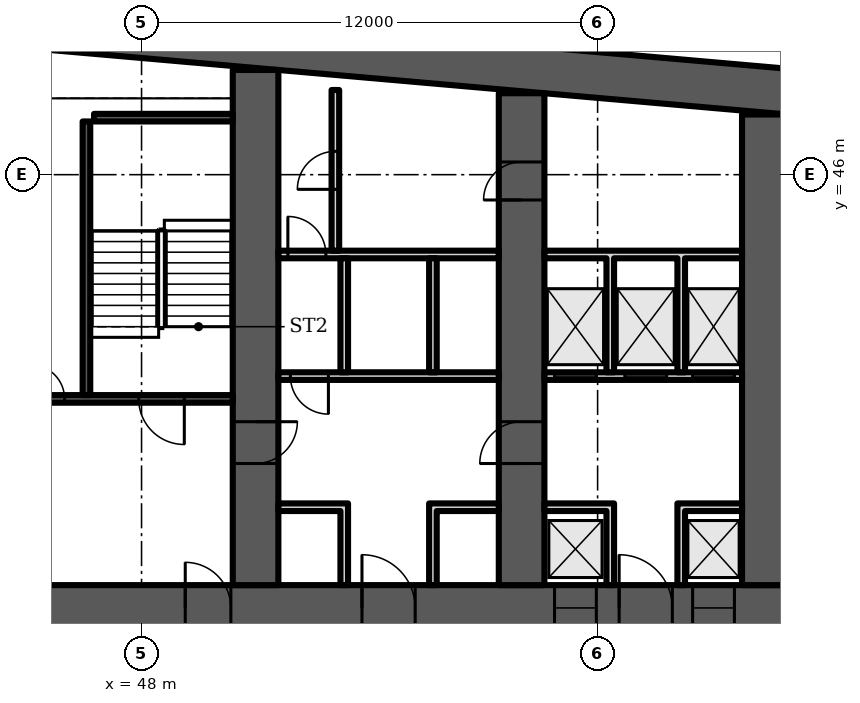
"""IFC4 building model, lengths in metres.
Left out: names, types, materials, properties, quantities, classifications, styles, units other than length and angle.
Written with IfcOpenShell. Run it as: python <this file> out.ifc"""

import sys

from ifc_helpers import new_model, si_unit, direction, frame, frame_2d, origin, place, context, subcontext, project, spatial, polyline, rectangle, outline, extrude, element, fill, save


model = new_model("IFC4")
c1 = context("Model", 3, precision=1e-05, world=origin(), true_north=direction((0.0, 1.0)))
c2 = subcontext(c1, "Body", "Model", "MODEL_VIEW")
j1 = project(units=[si_unit("LENGTHUNIT", "METRE"), si_unit("PLANEANGLEUNIT", "RADIAN")], contexts=[c1])
p1 = place(None, origin())
s1 = spatial("IfcSite", under=j1, at=p1, CompositionType="ELEMENT")
p2 = place(p1, origin())
s2 = spatial("IfcBuilding", under=s1, at=p2, CompositionType="ELEMENT")
p3 = place(p2, frame((0.0, 0.0, 81.1)))
s3 = spatial("IfcBuildingStorey", under=s2, at=p3, CompositionType="ELEMENT", Elevation=81.1)
p4 = place(p3, frame((0.0, 0.0, -0.0)))
e1 = element("IfcWall", 1, at=p4, inside=s3, PredefinedType="SHEAR", context=c2, shape_type="SweptSolid", body=[
    extrude(outline(polyline([(9.0, 47.583), (37.0, 50.032), (65.0, 47.583), (65.0, 48.787), (37.0, 51.237), (9.0, 48.787), (9.0, 47.583)])), origin(), (0.0, 0.0, 1.0), 3.6),
])
p5 = place(p3, frame((9.0, 34.6, 0.0), z_axis=(0.0, 0.0, 1.0), x_axis=(1.0, 0.0, 0.0)))
e2 = element("IfcWall", 2, at=p5, inside=s3, PredefinedType="SHEAR", context=c2, shape_type="SweptSolid", body=[
    extrude(rectangle(XDim=56.0, YDim=1.2, at=frame_2d((28.0, 0.0))), origin(), (0.0, 0.0, 1.0), 3.6),
])
p6 = place(p5, frame((2.0, 0.0, 0.0)))
e3 = element("IfcOpeningElement", 3, at=p6, cuts=e2, PredefinedType="OPENING", context=c2, shape_type="SweptSolid", body=[
    extrude(rectangle(XDim=1.0, YDim=2.1, at=frame_2d((0.5, 1.05))), frame((0.0, 0.61, 0.0), z_axis=(0.0, -1.0, 0.0), x_axis=(1.0, 0.0, 0.0)), (0.0, 0.0, 1.0), 1.22),
])
p7 = place(p5, frame((4.6, 0.0, 0.0)))
e4 = element("IfcOpeningElement", 4, at=p7, cuts=e2, PredefinedType="OPENING", context=c2, shape_type="SweptSolid", body=[
    extrude(rectangle(XDim=1.0, YDim=2.1, at=frame_2d((0.5, 1.05))), frame((0.0, 0.61, 0.0), z_axis=(0.0, -1.0, 0.0), x_axis=(1.0, 0.0, 0.0)), (0.0, 0.0, 1.0), 1.22),
])
p8 = place(p5, frame((7.867, 0.0, 0.0)))
e5 = element("IfcOpeningElement", 5, at=p8, cuts=e2, PredefinedType="OPENING", context=c2, shape_type="SweptSolid", body=[
    extrude(rectangle(XDim=1.1, YDim=2.1, at=frame_2d((0.55, 1.05))), frame((0.0, 0.61, 0.0), z_axis=(0.0, -1.0, 0.0), x_axis=(1.0, 0.0, 0.0)), (0.0, 0.0, 1.0), 1.22),
])
p9 = place(p5, frame((12.033, 0.0, 0.0)))
e6 = element("IfcOpeningElement", 6, at=p9, cuts=e2, PredefinedType="OPENING", context=c2, shape_type="SweptSolid", body=[
    extrude(rectangle(XDim=1.1, YDim=2.1, at=frame_2d((0.55, 1.05))), frame((0.0, 0.61, 0.0), z_axis=(0.0, -1.0, 0.0), x_axis=(1.0, 0.0, 0.0)), (0.0, 0.0, 1.0), 1.22),
])
p10 = place(p5, frame((9.8, 0.0, 0.0)))
e7 = element("IfcOpeningElement", 7, at=p10, cuts=e2, PredefinedType="OPENING", context=c2, shape_type="SweptSolid", body=[
    extrude(rectangle(XDim=1.4, YDim=2.1, at=frame_2d((0.7, 1.05))), frame((0.0, 0.61, 0.0), z_axis=(0.0, -1.0, 0.0), x_axis=(1.0, 0.0, 0.0)), (0.0, 0.0, 1.0), 1.22),
])
p11 = place(p5, frame((14.65, 0.0, 0.0)))
e8 = element("IfcOpeningElement", 8, at=p11, cuts=e2, PredefinedType="OPENING", context=c2, shape_type="SweptSolid", body=[
    extrude(rectangle(XDim=1.2, YDim=2.1, at=frame_2d((0.6, 1.05))), frame((0.0, 0.61, 0.0), z_axis=(0.0, -1.0, 0.0), x_axis=(1.0, 0.0, 0.0)), (0.0, 0.0, 1.0), 1.22),
])
p12 = place(p5, frame((21.867, 0.0, 0.0)))
e9 = element("IfcOpeningElement", 9, at=p12, cuts=e2, PredefinedType="OPENING", context=c2, shape_type="SweptSolid", body=[
    extrude(rectangle(XDim=1.1, YDim=2.1, at=frame_2d((0.55, 1.05))), frame((0.0, 0.61, 0.0), z_axis=(0.0, -1.0, 0.0), x_axis=(1.0, 0.0, 0.0)), (0.0, 0.0, 1.0), 1.22),
])
p13 = place(p5, frame((26.033, 0.0, 0.0)))
e10 = element("IfcOpeningElement", 10, at=p13, cuts=e2, PredefinedType="OPENING", context=c2, shape_type="SweptSolid", body=[
    extrude(rectangle(XDim=1.1, YDim=2.1, at=frame_2d((0.55, 1.05))), frame((0.0, 0.61, 0.0), z_axis=(0.0, -1.0, 0.0), x_axis=(1.0, 0.0, 0.0)), (0.0, 0.0, 1.0), 1.22),
])
p14 = place(p5, frame((23.8, 0.0, 0.0)))
e11 = element("IfcOpeningElement", 11, at=p14, cuts=e2, PredefinedType="OPENING", context=c2, shape_type="SweptSolid", body=[
    extrude(rectangle(XDim=1.4, YDim=2.1, at=frame_2d((0.7, 1.05))), frame((0.0, 0.61, 0.0), z_axis=(0.0, -1.0, 0.0), x_axis=(1.0, 0.0, 0.0)), (0.0, 0.0, 1.0), 1.22),
])
p15 = place(p5, frame((28.867, 0.0, 0.0)))
e12 = element("IfcOpeningElement", 12, at=p15, cuts=e2, PredefinedType="OPENING", context=c2, shape_type="SweptSolid", body=[
    extrude(rectangle(XDim=1.1, YDim=2.1, at=frame_2d((0.55, 1.05))), frame((0.0, 0.61, 0.0), z_axis=(0.0, -1.0, 0.0), x_axis=(1.0, 0.0, 0.0)), (0.0, 0.0, 1.0), 1.22),
])
p16 = place(p5, frame((33.033, 0.0, 0.0)))
e13 = element("IfcOpeningElement", 13, at=p16, cuts=e2, PredefinedType="OPENING", context=c2, shape_type="SweptSolid", body=[
    extrude(rectangle(XDim=1.1, YDim=2.1, at=frame_2d((0.55, 1.05))), frame((0.0, 0.61, 0.0), z_axis=(0.0, -1.0, 0.0), x_axis=(1.0, 0.0, 0.0)), (0.0, 0.0, 1.0), 1.22),
])
p17 = place(p5, frame((40.15, 0.0, 0.0)))
e14 = element("IfcOpeningElement", 14, at=p17, cuts=e2, PredefinedType="OPENING", context=c2, shape_type="SweptSolid", body=[
    extrude(rectangle(XDim=1.2, YDim=2.1, at=frame_2d((0.6, 1.05))), frame((0.0, 0.61, 0.0), z_axis=(0.0, -1.0, 0.0), x_axis=(1.0, 0.0, 0.0)), (0.0, 0.0, 1.0), 1.22),
])
p18 = place(p5, frame((44.8, 0.0, 0.0)))
e15 = element("IfcOpeningElement", 15, at=p18, cuts=e2, PredefinedType="OPENING", context=c2, shape_type="SweptSolid", body=[
    extrude(rectangle(XDim=1.4, YDim=2.1, at=frame_2d((0.7, 1.05))), frame((0.0, 0.61, 0.0), z_axis=(0.0, -1.0, 0.0), x_axis=(1.0, 0.0, 0.0)), (0.0, 0.0, 1.0), 1.22),
])
p19 = place(p5, frame((49.867, 0.0, 0.0)))
e16 = element("IfcOpeningElement", 16, at=p19, cuts=e2, PredefinedType="OPENING", context=c2, shape_type="SweptSolid", body=[
    extrude(rectangle(XDim=1.1, YDim=2.1, at=frame_2d((0.55, 1.05))), frame((0.0, 0.61, 0.0), z_axis=(0.0, -1.0, 0.0), x_axis=(1.0, 0.0, 0.0)), (0.0, 0.0, 1.0), 1.22),
])
p20 = place(p5, frame((53.5, 0.0, 0.0)))
e17 = element("IfcOpeningElement", 17, at=p20, cuts=e2, PredefinedType="OPENING", context=c2, shape_type="SweptSolid", body=[
    extrude(rectangle(XDim=1.1, YDim=2.1, at=frame_2d((0.55, 1.05))), frame((0.0, 0.61, 0.0), z_axis=(0.0, -1.0, 0.0), x_axis=(1.0, 0.0, 0.0)), (0.0, 0.0, 1.0), 1.22),
])
p21 = place(p5, frame((51.567, 0.0, 0.0)))
e18 = element("IfcOpeningElement", 18, at=p21, cuts=e2, PredefinedType="OPENING", context=c2, shape_type="SweptSolid", body=[
    extrude(rectangle(XDim=1.4, YDim=2.1, at=frame_2d((0.7, 1.05))), frame((0.0, 0.61, 0.0), z_axis=(0.0, -1.0, 0.0), x_axis=(1.0, 0.0, 0.0)), (0.0, 0.0, 1.0), 1.22),
])
p22 = place(p3, frame((51.0, 35.2, 0.0), z_axis=(0.0, 0.0, 1.0), x_axis=(0.0, 1.0, 0.0)))
e19 = element("IfcWall", 19, at=p22, inside=s3, PredefinedType="SHEAR", context=c2, shape_type="SweptSolid", body=[
    extrude(rectangle(XDim=13.555, YDim=1.2, at=frame_2d((6.778, 0.0))), origin(), (0.0, 0.0, 1.0), 3.6),
])
p23 = place(p22, frame((3.2, 0.0, 0.0)))
e20 = element("IfcOpeningElement", 20, at=p23, cuts=e19, PredefinedType="OPENING", context=c2, shape_type="SweptSolid", body=[
    extrude(rectangle(XDim=1.1, YDim=2.1, at=frame_2d((0.55, 1.05))), frame((0.0, 0.61, 0.0), z_axis=(0.0, -1.0, 0.0), x_axis=(1.0, 0.0, 0.0)), (0.0, 0.0, 1.0), 1.22),
])
p24 = place(p3, frame((58.0, 35.2, 0.0), z_axis=(0.0, 0.0, 1.0), x_axis=(0.0, 1.0, 0.0)))
e21 = element("IfcWall", 21, at=p24, inside=s3, PredefinedType="SHEAR", context=c2, shape_type="SweptSolid", body=[
    extrude(rectangle(XDim=12.943, YDim=1.2, at=frame_2d((6.471, 0.0))), origin(), (0.0, 0.0, 1.0), 3.6),
])
p25 = place(p24, frame((10.134, 0.0, 0.0)))
e22 = element("IfcOpeningElement", 22, at=p25, cuts=e21, PredefinedType="OPENING", context=c2, shape_type="SweptSolid", body=[
    extrude(rectangle(XDim=1.0, YDim=2.1, at=frame_2d((0.5, 1.05))), frame((0.0, 0.61, 0.0), z_axis=(0.0, -1.0, 0.0), x_axis=(1.0, 0.0, 0.0)), (0.0, 0.0, 1.0), 1.22),
])
p26 = place(p24, frame((3.2, 0.0, 0.0)))
e23 = element("IfcOpeningElement", 23, at=p26, cuts=e21, PredefinedType="OPENING", context=c2, shape_type="SweptSolid", body=[
    extrude(rectangle(XDim=1.1, YDim=2.1, at=frame_2d((0.55, 1.05))), frame((0.0, 0.61, 0.0), z_axis=(0.0, -1.0, 0.0), x_axis=(1.0, 0.0, 0.0)), (0.0, 0.0, 1.0), 1.22),
])
p27 = place(p3, frame((64.4, 35.2, 0.0), z_axis=(0.0, 0.0, 1.0), x_axis=(0.0, 1.0, 0.0)))
e24 = element("IfcWall", 24, at=p27, inside=s3, PredefinedType="SHEAR", context=c2, shape_type="SweptSolid", body=[
    extrude(rectangle(XDim=12.383, YDim=1.2, at=frame_2d((6.191, 0.0))), origin(), (0.0, 0.0, 1.0), 3.6),
])
p28 = place(p3, frame((44.6, 40.1, 0.0), z_axis=(0.0, 0.0, 1.0), x_axis=(1.0, 0.0, 0.0)))
e25 = element("IfcWall", 25, at=p28, inside=s3, PredefinedType="SHEAR", context=c2, shape_type="SweptSolid", body=[
    extrude(rectangle(XDim=5.8, YDim=0.2, at=frame_2d((2.9, 0.0))), origin(), (0.0, 0.0, 1.0), 3.2),
])
p29 = place(p28, frame((3.325, 0.0, 0.0)))
e26 = element("IfcOpeningElement", 26, at=p29, cuts=e25, PredefinedType="OPENING", context=c2, shape_type="SweptSolid", body=[
    extrude(rectangle(XDim=1.2, YDim=2.1, at=frame_2d((0.6, 1.05))), frame((0.0, 0.11, 0.0), z_axis=(0.0, -1.0, 0.0), x_axis=(1.0, 0.0, 0.0)), (0.0, 0.0, 1.0), 0.22),
])
p30 = place(p28, frame((0.475, 0.0, 0.0)))
e27 = element("IfcOpeningElement", 27, at=p30, cuts=e25, PredefinedType="OPENING", context=c2, shape_type="SweptSolid", body=[
    extrude(rectangle(XDim=0.9, YDim=2.1, at=frame_2d((0.45, 1.05))), frame((0.0, 0.11, 0.0), z_axis=(0.0, -1.0, 0.0), x_axis=(1.0, 0.0, 0.0)), (0.0, 0.0, 1.0), 0.22),
])
p31 = place(p3, frame((46.55, 40.2, 0.0), z_axis=(0.0, 0.0, 1.0), x_axis=(0.0, 1.0, 0.0)))
e28 = element("IfcWall", 28, at=p31, inside=s3, PredefinedType="SHEAR", context=c2, shape_type="SweptSolid", body=[
    extrude(rectangle(XDim=7.2, YDim=0.2, at=frame_2d((3.6, 0.0))), origin(), (0.0, 0.0, 1.0), 3.2),
])
p32 = place(p3, frame((46.75, 47.5, 0.0), z_axis=(0.0, 0.0, 1.0), x_axis=(1.0, 0.0, 0.0)))
e29 = element("IfcWall", 29, at=p32, inside=s3, PredefinedType="SHEAR", context=c2, shape_type="SweptSolid", body=[
    extrude(rectangle(XDim=3.65, YDim=0.2, at=frame_2d((1.825, 0.0))), origin(), (0.0, 0.0, 1.0), 3.2),
])
p33 = place(p3, frame((51.6, 40.7, 0.0), z_axis=(0.0, 0.0, 1.0), x_axis=(1.0, 0.0, 0.0)))
e30 = element("IfcWall", 30, at=p33, inside=s3, PredefinedType="PARTITIONING", context=c2, shape_type="SweptSolid", body=[
    extrude(rectangle(XDim=5.8, YDim=0.2, at=frame_2d((2.9, 0.0))), origin(), (0.0, 0.0, 1.0), 3.2),
])
p34 = place(p33, frame((0.317, 0.0, 0.0)))
e31 = element("IfcOpeningElement", 31, at=p34, cuts=e30, PredefinedType="OPENING", context=c2, shape_type="SweptSolid", body=[
    extrude(rectangle(XDim=1.0, YDim=2.1, at=frame_2d((0.5, 1.05))), frame((0.0, 0.11, 0.0), z_axis=(0.0, -1.0, 0.0), x_axis=(1.0, 0.0, 0.0)), (0.0, 0.0, 1.0), 0.22),
])
p35 = place(p3, frame((51.6, 43.9, 0.0), z_axis=(0.0, 0.0, 1.0), x_axis=(1.0, 0.0, 0.0)))
e32 = element("IfcWall", 32, at=p35, inside=s3, PredefinedType="PARTITIONING", context=c2, shape_type="SweptSolid", body=[
    extrude(rectangle(XDim=5.8, YDim=0.2, at=frame_2d((2.9, 0.0))), origin(), (0.0, 0.0, 1.0), 3.2),
])
p36 = place(p35, frame((0.25, 0.0, 0.0)))
e33 = element("IfcOpeningElement", 33, at=p36, cuts=e32, PredefinedType="OPENING", context=c2, shape_type="SweptSolid", body=[
    extrude(rectangle(XDim=1.0, YDim=2.1, at=frame_2d((0.5, 1.05))), frame((0.0, 0.11, 0.0), z_axis=(0.0, -1.0, 0.0), x_axis=(1.0, 0.0, 0.0)), (0.0, 0.0, 1.0), 0.22),
])
p37 = place(p3, frame((0.0, 0.0, -0.0)))
e34 = element("IfcWall", 34, at=p37, inside=s3, PredefinedType="PARTITIONING", context=c2, shape_type="SweptSolid", body=[
    extrude(outline(polyline([(53.233, 37.15), (51.6, 37.15), (51.6, 37.35), (53.233, 37.35), (53.433, 37.35), (53.433, 35.2), (53.233, 35.2), (53.233, 37.15)])), origin(), (0.0, 0.0, 1.0), 3.2),
])
p38 = place(p3, frame((0.0, 0.0, -0.0)))
e35 = element("IfcWall", 35, at=p38, inside=s3, PredefinedType="PARTITIONING", context=c2, shape_type="SweptSolid", body=[
    extrude(outline(polyline([(55.567, 37.35), (55.767, 37.35), (57.4, 37.35), (57.4, 37.15), (55.767, 37.15), (55.767, 35.2), (55.567, 35.2), (55.567, 37.35)])), origin(), (0.0, 0.0, 1.0), 3.2),
])
p39 = place(p3, frame((0.0, 0.0, -0.0)))
e36 = element("IfcWall", 36, at=p39, inside=s3, PredefinedType="PARTITIONING", context=c2, shape_type="SweptSolid", body=[
    extrude(outline(polyline([(53.233, 40.8), (53.233, 43.8), (53.433, 43.8), (53.433, 40.8), (53.233, 40.8)])), origin(), (0.0, 0.0, 1.0), 3.2),
])
p40 = place(p3, frame((0.0, 0.0, -0.0)))
e37 = element("IfcWall", 37, at=p40, inside=s3, PredefinedType="PARTITIONING", context=c2, shape_type="SweptSolid", body=[
    extrude(outline(polyline([(55.567, 40.8), (55.567, 43.8), (55.767, 43.8), (55.767, 40.8), (55.567, 40.8)])), origin(), (0.0, 0.0, 1.0), 3.2),
])
p41 = place(p3, frame((53.1, 44.0, 0.0), z_axis=(0.0, 0.0, 1.0), x_axis=(0.0, 1.0, 0.0)))
e38 = element("IfcWall", 38, at=p41, inside=s3, PredefinedType="PARTITIONING", context=c2, shape_type="SweptSolid", body=[
    extrude(rectangle(XDim=4.228, YDim=0.2, at=frame_2d((2.114, 0.0))), origin(), (0.0, 0.0, 1.0), 3.2),
])
p42 = place(p41, frame((1.614, 0.0, 0.0)))
e39 = element("IfcOpeningElement", 39, at=p42, cuts=e38, PredefinedType="OPENING", context=c2, shape_type="SweptSolid", body=[
    extrude(rectangle(XDim=1.0, YDim=2.1, at=frame_2d((0.5, 1.05))), frame((0.0, 0.11, 0.0), z_axis=(0.0, -1.0, 0.0), x_axis=(1.0, 0.0, 0.0)), (0.0, 0.0, 1.0), 0.22),
])
p43 = place(p3, frame((58.6, 40.7, 0.0), z_axis=(0.0, 0.0, 1.0), x_axis=(1.0, 0.0, 0.0)))
e40 = element("IfcWall", 40, at=p43, inside=s3, PredefinedType="PARTITIONING", context=c2, shape_type="SweptSolid", body=[
    extrude(rectangle(XDim=5.2, YDim=0.2, at=frame_2d((2.6, 0.0))), origin(), (0.0, 0.0, 1.0), 3.2),
])
p44 = place(p43, frame((0.267, 0.0, 0.0)))
e41 = element("IfcOpeningElement", 41, at=p44, cuts=e40, PredefinedType="OPENING", context=c2, shape_type="SweptSolid", body=[
    extrude(rectangle(XDim=1.1, YDim=2.1, at=frame_2d((0.55, 1.05))), frame((0.0, 0.11, 0.0), z_axis=(0.0, -1.0, 0.0), x_axis=(1.0, 0.0, 0.0)), (0.0, 0.0, 1.0), 0.22),
])
p45 = place(p43, frame((2.117, 0.0, 0.0)))
e42 = element("IfcOpeningElement", 42, at=p45, cuts=e40, PredefinedType="OPENING", context=c2, shape_type="SweptSolid", body=[
    extrude(rectangle(XDim=1.1, YDim=2.1, at=frame_2d((0.55, 1.05))), frame((0.0, 0.11, 0.0), z_axis=(0.0, -1.0, 0.0), x_axis=(1.0, 0.0, 0.0)), (0.0, 0.0, 1.0), 0.22),
])
p46 = place(p43, frame((3.9, 0.0, 0.0)))
e43 = element("IfcOpeningElement", 43, at=p46, cuts=e40, PredefinedType="OPENING", context=c2, shape_type="SweptSolid", body=[
    extrude(rectangle(XDim=1.1, YDim=2.1, at=frame_2d((0.55, 1.05))), frame((0.0, 0.11, 0.0), z_axis=(0.0, -1.0, 0.0), x_axis=(1.0, 0.0, 0.0)), (0.0, 0.0, 1.0), 0.22),
])
p47 = place(p3, frame((0.0, 0.0, -0.0)))
e44 = element("IfcWall", 44, at=p47, inside=s3, PredefinedType="PARTITIONING", context=c2, shape_type="SweptSolid", body=[
    extrude(outline(polyline([(60.233, 37.15), (58.6, 37.15), (58.6, 37.35), (60.233, 37.35), (60.433, 37.35), (60.433, 35.2), (60.233, 35.2), (60.233, 37.15)])), origin(), (0.0, 0.0, 1.0), 3.2),
])
p48 = place(p3, frame((0.0, 0.0, -0.0)))
e45 = element("IfcWall", 45, at=p48, inside=s3, PredefinedType="PARTITIONING", context=c2, shape_type="SweptSolid", body=[
    extrude(outline(polyline([(62.1, 37.35), (62.3, 37.35), (63.8, 37.35), (63.8, 37.15), (62.3, 37.15), (62.3, 35.2), (62.1, 35.2), (62.1, 37.35)])), origin(), (0.0, 0.0, 1.0), 3.2),
])
p49 = place(p3, frame((0.0, 0.0, -0.0)))
e46 = element("IfcWall", 46, at=p49, inside=s3, PredefinedType="PARTITIONING", context=c2, shape_type="SweptSolid", body=[
    extrude(outline(polyline([(60.433, 40.8), (60.233, 40.8), (60.233, 43.8), (58.6, 43.8), (58.6, 44.0), (63.8, 44.0), (63.8, 43.8), (62.3, 43.8), (62.3, 40.8), (62.1, 40.8), (62.1, 43.8), (60.433, 43.8), (60.433, 40.8)])), origin(), (0.0, 0.0, 1.0), 3.2),
])
p50 = place(p29, origin())
e47 = element("IfcDoor", 47, at=p50, inside=s3, OperationType="SINGLE_SWING_RIGHT", PredefinedType="DOOR", context=c2, shape_type="SweptSolid", body=[
    extrude(rectangle(XDim=1.2, YDim=2.1, at=frame_2d((0.6, 1.05))), frame((0.0, 0.025, 0.0), z_axis=(0.0, -1.0, 0.0), x_axis=(1.0, 0.0, 0.0)), (0.0, 0.0, 1.0), 0.05),
])
fill(e26, e47)
p51 = place(p30, origin())
e48 = element("IfcDoor", 48, at=p51, inside=s3, OperationType="SINGLE_SWING_LEFT", PredefinedType="DOOR", context=c2, shape_type="SweptSolid", body=[
    extrude(rectangle(XDim=0.9, YDim=2.1, at=frame_2d((0.45, 1.05))), frame((0.0, 0.025, 0.0), z_axis=(0.0, -1.0, 0.0), x_axis=(1.0, 0.0, 0.0)), (0.0, 0.0, 1.0), 0.05),
])
fill(e27, e48)
p52 = place(p17, origin())
e49 = element("IfcDoor", 49, at=p52, inside=s3, OperationType="SINGLE_SWING_LEFT", PredefinedType="DOOR", context=c2, shape_type="SweptSolid", body=[
    extrude(rectangle(XDim=1.2, YDim=2.1, at=frame_2d((0.6, 1.05))), frame((0.0, 0.025, 0.0), z_axis=(0.0, -1.0, 0.0), x_axis=(1.0, 0.0, 0.0)), (0.0, 0.0, 1.0), 0.05),
])
fill(e14, e49)
p53 = place(p18, origin())
e50 = element("IfcDoor", 50, at=p53, inside=s3, OperationType="DOUBLE_DOOR_SINGLE_SWING", PredefinedType="DOOR", context=c2, shape_type="SweptSolid", body=[
    extrude(rectangle(XDim=1.4, YDim=2.1, at=frame_2d((0.7, 1.05))), frame((0.0, 0.025, 0.0), z_axis=(0.0, -1.0, 0.0), x_axis=(1.0, 0.0, 0.0)), (0.0, 0.0, 1.0), 0.05),
])
fill(e15, e50)
p54 = place(p34, origin())
e51 = element("IfcDoor", 51, at=p54, inside=s3, OperationType="SINGLE_SWING_RIGHT", PredefinedType="DOOR", context=c2, shape_type="SweptSolid", body=[
    extrude(rectangle(XDim=1.0, YDim=2.1, at=frame_2d((0.5, 1.05))), frame((0.0, 0.025, 0.0), z_axis=(0.0, -1.0, 0.0), x_axis=(1.0, 0.0, 0.0)), (0.0, 0.0, 1.0), 0.05),
])
fill(e31, e51)
p55 = place(p36, origin())
e52 = element("IfcDoor", 52, at=p55, inside=s3, OperationType="SINGLE_SWING_LEFT", PredefinedType="DOOR", context=c2, shape_type="SweptSolid", body=[
    extrude(rectangle(XDim=1.0, YDim=2.1, at=frame_2d((0.5, 1.05))), frame((0.0, 0.025, 0.0), z_axis=(0.0, -1.0, 0.0), x_axis=(1.0, 0.0, 0.0)), (0.0, 0.0, 1.0), 0.05),
])
fill(e33, e52)
p56 = place(p42, origin())
e53 = element("IfcDoor", 53, at=p56, inside=s3, OperationType="SINGLE_SWING_LEFT", PredefinedType="DOOR", context=c2, shape_type="SweptSolid", body=[
    extrude(rectangle(XDim=1.0, YDim=2.1, at=frame_2d((0.5, 1.05))), frame((0.0, 0.025, 0.0), z_axis=(0.0, -1.0, 0.0), x_axis=(1.0, 0.0, 0.0)), (0.0, 0.0, 1.0), 0.05),
])
fill(e39, e53)
p57 = place(p19, origin())
e54 = element("IfcDoor", 54, at=p57, inside=s3, OperationType="DOUBLE_DOOR_SLIDING", PredefinedType="DOOR", context=c2, shape_type="SweptSolid", body=[
    extrude(rectangle(XDim=1.1, YDim=2.1, at=frame_2d((0.55, 1.05))), frame((0.0, 0.025, 0.0), z_axis=(0.0, -1.0, 0.0), x_axis=(1.0, 0.0, 0.0)), (0.0, 0.0, 1.0), 0.05),
])
fill(e16, e54)
p58 = place(p20, origin())
e55 = element("IfcDoor", 55, at=p58, inside=s3, OperationType="DOUBLE_DOOR_SLIDING", PredefinedType="DOOR", context=c2, shape_type="SweptSolid", body=[
    extrude(rectangle(XDim=1.1, YDim=2.1, at=frame_2d((0.55, 1.05))), frame((0.0, 0.025, 0.0), z_axis=(0.0, -1.0, 0.0), x_axis=(1.0, 0.0, 0.0)), (0.0, 0.0, 1.0), 0.05),
])
fill(e17, e55)
p59 = place(p21, origin())
e56 = element("IfcDoor", 56, at=p59, inside=s3, OperationType="DOUBLE_DOOR_SINGLE_SWING", PredefinedType="DOOR", context=c2, shape_type="SweptSolid", body=[
    extrude(rectangle(XDim=1.4, YDim=2.1, at=frame_2d((0.7, 1.05))), frame((0.0, 0.025, 0.0), z_axis=(0.0, -1.0, 0.0), x_axis=(1.0, 0.0, 0.0)), (0.0, 0.0, 1.0), 0.05),
])
fill(e18, e56)
p60 = place(p44, origin())
e57 = element("IfcDoor", 57, at=p60, inside=s3, OperationType="DOUBLE_DOOR_SLIDING", PredefinedType="DOOR", context=c2, shape_type="SweptSolid", body=[
    extrude(rectangle(XDim=1.1, YDim=2.1, at=frame_2d((0.55, 1.05))), frame((0.0, 0.025, 0.0), z_axis=(0.0, -1.0, 0.0), x_axis=(1.0, 0.0, 0.0)), (0.0, 0.0, 1.0), 0.05),
])
fill(e41, e57)
p61 = place(p45, origin())
e58 = element("IfcDoor", 58, at=p61, inside=s3, OperationType="DOUBLE_DOOR_SLIDING", PredefinedType="DOOR", context=c2, shape_type="SweptSolid", body=[
    extrude(rectangle(XDim=1.1, YDim=2.1, at=frame_2d((0.55, 1.05))), frame((0.0, 0.025, 0.0), z_axis=(0.0, -1.0, 0.0), x_axis=(1.0, 0.0, 0.0)), (0.0, 0.0, 1.0), 0.05),
])
fill(e42, e58)
p62 = place(p46, origin())
e59 = element("IfcDoor", 59, at=p62, inside=s3, OperationType="DOUBLE_DOOR_SLIDING", PredefinedType="DOOR", context=c2, shape_type="SweptSolid", body=[
    extrude(rectangle(XDim=1.1, YDim=2.1, at=frame_2d((0.55, 1.05))), frame((0.0, 0.025, 0.0), z_axis=(0.0, -1.0, 0.0), x_axis=(1.0, 0.0, 0.0)), (0.0, 0.0, 1.0), 0.05),
])
fill(e43, e59)
p63 = place(p25, origin())
e60 = element("IfcDoor", 60, at=p63, inside=s3, OperationType="SINGLE_SWING_LEFT", PredefinedType="DOOR", context=c2, shape_type="SweptSolid", body=[
    extrude(rectangle(XDim=1.0, YDim=2.1, at=frame_2d((0.5, 1.05))), frame((0.0, 0.6, 0.0), z_axis=(0.0, -1.0, 0.0), x_axis=(1.0, 0.0, 0.0)), (0.0, 0.0, 1.0), 1.199),
])
fill(e22, e60)
p64 = place(p23, origin())
e61 = element("IfcDoor", 61, at=p64, inside=s3, OperationType="SINGLE_SWING_RIGHT", PredefinedType="DOOR", context=c2, shape_type="SweptSolid", body=[
    extrude(rectangle(XDim=1.1, YDim=2.1, at=frame_2d((0.55, 1.05))), frame((0.0, 0.025, 0.0), z_axis=(0.0, -1.0, 0.0), x_axis=(1.0, 0.0, 0.0)), (0.0, 0.0, 1.0), 0.05),
])
fill(e20, e61)
p65 = place(p26, origin())
e62 = element("IfcDoor", 62, at=p65, inside=s3, OperationType="SINGLE_SWING_LEFT", PredefinedType="DOOR", context=c2, shape_type="SweptSolid", body=[
    extrude(rectangle(XDim=1.1, YDim=2.1, at=frame_2d((0.55, 1.05))), frame((0.0, 0.025, 0.0), z_axis=(0.0, -1.0, 0.0), x_axis=(1.0, 0.0, 0.0)), (0.0, 0.0, 1.0), 0.05),
])
fill(e23, e62)
save(model, sys.argv[1])
